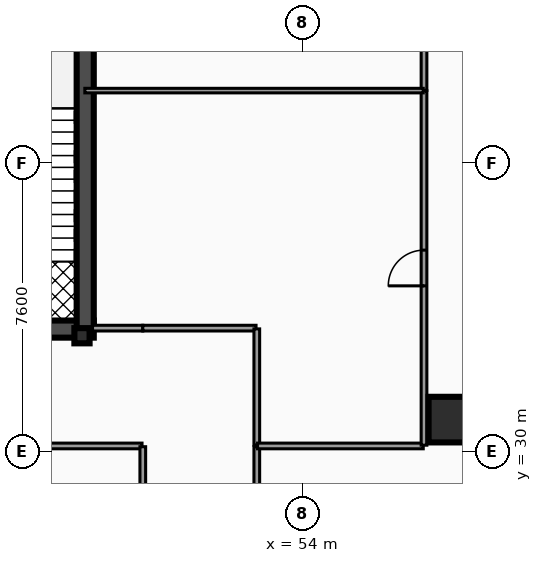
"""IFC4 building model, lengths in metres.
Left out: names, types, materials, properties, quantities, classifications, styles, units other than length and angle.
Written with IfcOpenShell. Run it as: python <this file> out.ifc"""

import sys

from ifc_helpers import new_model, si_unit, direction, frame, frame_2d, origin, origin_2d, place, context, subcontext, project, spatial, rectangle, hollow_rectangle, extrude, element, fill, save


model = new_model("IFC4")
c1 = context("Model", 3, precision=1e-05, world=origin(), true_north=direction((0.0, 1.0)))
c2 = subcontext(c1, "Body", "Model", "MODEL_VIEW")
j1 = project(units=[si_unit("LENGTHUNIT", "METRE"), si_unit("PLANEANGLEUNIT", "RADIAN")], contexts=[c1])
p1 = place(None, origin())
s1 = spatial("IfcSite", under=j1, at=p1, CompositionType="ELEMENT")
p2 = place(p1, origin())
s2 = spatial("IfcBuilding", under=s1, at=p2, CompositionType="ELEMENT")
p3 = place(p2, origin())
s3 = spatial("IfcBuildingStorey", under=s2, at=p3, CompositionType="ELEMENT", Elevation=0.0)
p4 = place(p3, frame((28.4, 33.225, 0.0), z_axis=(0.0, 0.0, 1.0), x_axis=(1.0, 0.0, 0.0)))
e1 = element("IfcWall", 1, at=p4, inside=s3, PredefinedType="SHEAR", context=c2, shape_type="SweptSolid", body=[
    extrude(rectangle(XDim=20.11, YDim=0.45, at=frame_2d((10.055, 0.0))), origin(), (0.0, 0.0, 1.0), 4.82),
])
p5 = place(p4, frame((4.03, 0.0, 0.0)))
e2 = element("IfcOpeningElement", 2, at=p5, cuts=e1, PredefinedType="OPENING", context=c2, shape_type="SweptSolid", body=[
    extrude(rectangle(XDim=1.1, YDim=2.15, at=frame_2d((0.55, 1.075))), frame((0.0, 0.235, 0.0), z_axis=(0.0, -1.0, 0.0), x_axis=(1.0, 0.0, 0.0)), (0.0, 0.0, 1.0), 0.47),
])
p6 = place(p4, frame((14.87, 0.0, 0.0)))
e3 = element("IfcOpeningElement", 3, at=p6, cuts=e1, PredefinedType="OPENING", context=c2, shape_type="SweptSolid", body=[
    extrude(rectangle(XDim=1.1, YDim=2.15, at=frame_2d((0.55, 1.075))), frame((0.0, 0.235, 0.0), z_axis=(0.0, -1.0, 0.0), x_axis=(1.0, 0.0, 0.0)), (0.0, 0.0, 1.0), 0.47),
])
p7 = place(p4, frame((5.95, 0.0, 0.0)))
e4 = element("IfcOpeningElement", 4, at=p7, cuts=e1, PredefinedType="OPENING", context=c2, shape_type="SweptSolid", body=[
    extrude(rectangle(XDim=1.0, YDim=2.1, at=frame_2d((0.5, 1.05))), frame((0.0, 0.235, 0.0), z_axis=(0.0, -1.0, 0.0), x_axis=(1.0, 0.0, 0.0)), (0.0, 0.0, 1.0), 0.47),
])
p8 = place(p4, frame((7.65, 0.0, 0.0)))
e5 = element("IfcOpeningElement", 5, at=p8, cuts=e1, PredefinedType="OPENING", context=c2, shape_type="SweptSolid", body=[
    extrude(rectangle(XDim=1.0, YDim=2.1, at=frame_2d((0.5, 1.05))), frame((0.0, 0.235, 0.0), z_axis=(0.0, -1.0, 0.0), x_axis=(1.0, 0.0, 0.0)), (0.0, 0.0, 1.0), 0.47),
])
p9 = place(p4, frame((11.35, 0.0, 0.0)))
e6 = element("IfcOpeningElement", 6, at=p9, cuts=e1, PredefinedType="OPENING", context=c2, shape_type="SweptSolid", body=[
    extrude(rectangle(XDim=1.0, YDim=2.1, at=frame_2d((0.5, 1.05))), frame((0.0, 0.235, 0.0), z_axis=(0.0, -1.0, 0.0), x_axis=(1.0, 0.0, 0.0)), (0.0, 0.0, 1.0), 0.47),
])
p10 = place(p4, frame((13.05, 0.0, 0.0)))
e7 = element("IfcOpeningElement", 7, at=p10, cuts=e1, PredefinedType="OPENING", context=c2, shape_type="SweptSolid", body=[
    extrude(rectangle(XDim=1.0, YDim=2.1, at=frame_2d((0.5, 1.05))), frame((0.0, 0.235, 0.0), z_axis=(0.0, -1.0, 0.0), x_axis=(1.0, 0.0, 0.0)), (0.0, 0.0, 1.0), 0.47),
])
p11 = place(p4, frame((1.31, 0.0, 0.0)))
e8 = element("IfcOpeningElement", 8, at=p11, cuts=e1, PredefinedType="OPENING", context=c2, shape_type="SweptSolid", body=[
    extrude(rectangle(XDim=1.1, YDim=2.2, at=frame_2d((0.55, 1.1))), frame((0.0, 0.235, 0.0), z_axis=(0.0, -1.0, 0.0), x_axis=(1.0, 0.0, 0.0)), (0.0, 0.0, 1.0), 0.47),
])
p12 = place(p4, frame((9.44, 0.0, 0.0)))
e9 = element("IfcOpeningElement", 9, at=p12, cuts=e1, PredefinedType="OPENING", context=c2, shape_type="SweptSolid", body=[
    extrude(rectangle(XDim=1.12, YDim=2.05, at=frame_2d((0.56, 1.025))), frame((0.0, 0.235, 0.0), z_axis=(0.0, -1.0, 0.0), x_axis=(1.0, 0.0, 0.0)), (0.0, 0.0, 1.0), 0.47),
])
p13 = place(p4, frame((17.65, 0.0, 0.0)))
e10 = element("IfcOpeningElement", 10, at=p13, cuts=e1, PredefinedType="OPENING", context=c2, shape_type="SweptSolid", body=[
    extrude(rectangle(XDim=1.1, YDim=2.2, at=frame_2d((0.55, 1.1))), frame((0.0, 0.235, 0.0), z_axis=(0.0, -1.0, 0.0), x_axis=(1.0, 0.0, 0.0)), (0.0, 0.0, 1.0), 0.47),
])
p14 = place(p3, frame((48.285, 33.225, 0.0), z_axis=(0.0, 0.0, 1.0), x_axis=(0.0, 1.0, 0.0)))
e11 = element("IfcWall", 11, at=p14, inside=s3, PredefinedType="SHEAR", context=c2, shape_type="SweptSolid", body=[
    extrude(rectangle(XDim=10.25, YDim=0.45, at=frame_2d((5.125, 0.0))), origin(), (0.0, 0.0, 1.0), 4.82),
])
p15 = place(p3, frame((57.92, 30.843, 0.0), z_axis=(0.0, 0.0, 1.0), x_axis=(1.0, 0.0, 0.0)))
e12 = element("IfcColumn", 12, at=p15, inside=s3, PredefinedType="COLUMN", context=c2, shape_type="SweptSolid", body=[
    extrude(hollow_rectangle(XDim=1.2, YDim=1.2, WallThickness=0.06, at=origin_2d()), origin(), (0.0, 0.0, 1.0), 4.82),
])
p16 = place(p3, frame((48.2, 33.05, 0.0), z_axis=(0.0, 0.0, 1.0), x_axis=(1.0, 0.0, 0.0)))
e13 = element("IfcColumn", 13, at=p16, inside=s3, PredefinedType="PILASTER", context=c2, shape_type="SweptSolid", body=[
    extrude(hollow_rectangle(XDim=0.4, YDim=0.4, WallThickness=0.02, at=origin_2d()), origin(), (0.0, 0.0, 1.0), 4.82),
])
p17 = place(p3, frame((52.8, 27.355, 0.0), z_axis=(0.0, 0.0, 1.0), x_axis=(0.0, 1.0, 0.0)))
e14 = element("IfcWall", 14, at=p17, inside=s3, PredefinedType="PARTITIONING", context=c2, shape_type="SweptSolid", body=[
    extrude(rectangle(XDim=2.775, YDim=0.15, at=frame_2d((1.387, 0.0))), origin(), (0.0, 0.0, 1.0), 3.777),
])
p18 = place(p3, frame((48.478, 33.25, 0.0), z_axis=(0.0, 0.0, 1.0), x_axis=(1.0, 0.0, 0.0)))
e15 = element("IfcWall", 15, at=p18, inside=s3, PredefinedType="PARTITIONING", context=c2, shape_type="SweptSolid", body=[
    extrude(rectangle(XDim=1.322, YDim=0.15, at=frame_2d((0.661, 0.0))), origin(), (0.0, 0.0, 1.0), 3.777),
])
p19 = place(p3, frame((49.8, 33.25, 0.0), z_axis=(0.0, 0.0, 1.0), x_axis=(1.0, 0.0, 0.0)))
e16 = element("IfcWall", 16, at=p19, inside=s3, PredefinedType="PARTITIONING", context=c2, shape_type="SweptSolid", body=[
    extrude(rectangle(XDim=2.98, YDim=0.15, at=frame_2d((1.49, 0.0))), origin(), (0.0, 0.0, 1.0), 3.777),
])
p20 = place(p3, frame((52.8, 30.17, 0.0), z_axis=(0.0, 0.0, 1.0), x_axis=(0.0, 1.0, 0.0)))
e17 = element("IfcWall", 17, at=p20, inside=s3, PredefinedType="PARTITIONING", context=c2, shape_type="SweptSolid", body=[
    extrude(rectangle(XDim=3.06, YDim=0.15, at=frame_2d((1.53, 0.0))), origin(), (0.0, 0.0, 1.0), 3.777),
])
p21 = place(p3, frame((44.97, 30.15, 0.0), z_axis=(0.0, 0.0, 1.0), x_axis=(1.0, 0.0, 0.0)))
e18 = element("IfcWall", 18, at=p21, inside=s3, PredefinedType="PARTITIONING", context=c2, shape_type="SweptSolid", body=[
    extrude(rectangle(XDim=4.81, YDim=0.15, at=frame_2d((2.405, 0.0))), origin(), (0.0, 0.0, 1.0), 3.777),
])
p22 = place(p3, frame((49.8, 14.305, 0.0), z_axis=(0.0, 0.0, 1.0), x_axis=(0.0, 1.0, 0.0)))
e19 = element("IfcWall", 19, at=p22, inside=s3, PredefinedType="PARTITIONING", context=c2, shape_type="SweptSolid", body=[
    extrude(rectangle(XDim=15.825, YDim=0.15, at=frame_2d((7.913, 0.0))), origin(), (0.0, 0.0, 1.0), 3.777),
])
p23 = place(p3, frame((52.82, 30.15, 0.0), z_axis=(0.0, 0.0, 1.0), x_axis=(1.0, 0.0, 0.0)))
e20 = element("IfcWall", 20, at=p23, inside=s3, PredefinedType="PARTITIONING", context=c2, shape_type="SweptSolid", body=[
    extrude(rectangle(XDim=4.36, YDim=0.15, at=frame_2d((2.18, 0.0))), origin(), (0.0, 0.0, 1.0), 3.777),
])
p24 = place(p3, frame((57.2, 30.17, 0.0), z_axis=(0.0, 0.0, 1.0), x_axis=(0.0, 1.0, 0.0)))
e21 = element("IfcWall", 21, at=p24, inside=s3, PredefinedType="PARTITIONING", context=c2, shape_type="SweptSolid", body=[
    extrude(rectangle(XDim=9.325, YDim=0.15, at=frame_2d((4.663, 0.0))), origin(), (0.0, 0.0, 1.0), 3.777),
])
p25 = place(p24, frame((4.192, 0.0, 0.0)))
e22 = element("IfcOpeningElement", 22, at=p25, cuts=e21, PredefinedType="OPENING", context=c2, shape_type="SweptSolid", body=[
    extrude(rectangle(XDim=0.94, YDim=2.05, at=frame_2d((0.47, 1.025))), frame((0.0, 0.085, 0.0), z_axis=(0.0, -1.0, 0.0), x_axis=(1.0, 0.0, 0.0)), (0.0, 0.0, 1.0), 0.17),
])
p26 = place(p3, frame((57.2, 39.505, 0.0), z_axis=(0.0, 0.0, 1.0), x_axis=(0.0, 1.0, 0.0)))
e23 = element("IfcWall", 23, at=p26, inside=s3, PredefinedType="PARTITIONING", context=c2, shape_type="SweptSolid", body=[
    extrude(rectangle(XDim=4.025, YDim=0.15, at=frame_2d((2.013, 0.0))), origin(), (0.0, 0.0, 1.0), 3.777),
])
p27 = place(p3, frame((48.275, 39.5, 0.0), z_axis=(0.0, 0.0, 1.0), x_axis=(1.0, 0.0, 0.0)))
e24 = element("IfcWall", 24, at=p27, inside=s3, PredefinedType="PARTITIONING", context=c2, shape_type="SweptSolid", body=[
    extrude(rectangle(XDim=8.905, YDim=0.12, at=frame_2d((4.453, 0.0))), origin(), (0.0, 0.0, 1.0), 3.777),
])
p28 = place(p25, origin())
e25 = element("IfcDoor", 25, at=p28, inside=s3, OperationType="SINGLE_SWING_LEFT", PredefinedType="DOOR", context=c2, shape_type="SweptSolid", body=[
    extrude(rectangle(XDim=0.94, YDim=2.05, at=frame_2d((0.47, 1.025))), frame((0.0, 0.025, 0.0), z_axis=(0.0, -1.0, 0.0), x_axis=(1.0, 0.0, 0.0)), (0.0, 0.0, 1.0), 0.05),
])
fill(e22, e25)
save(model, sys.argv[1])
